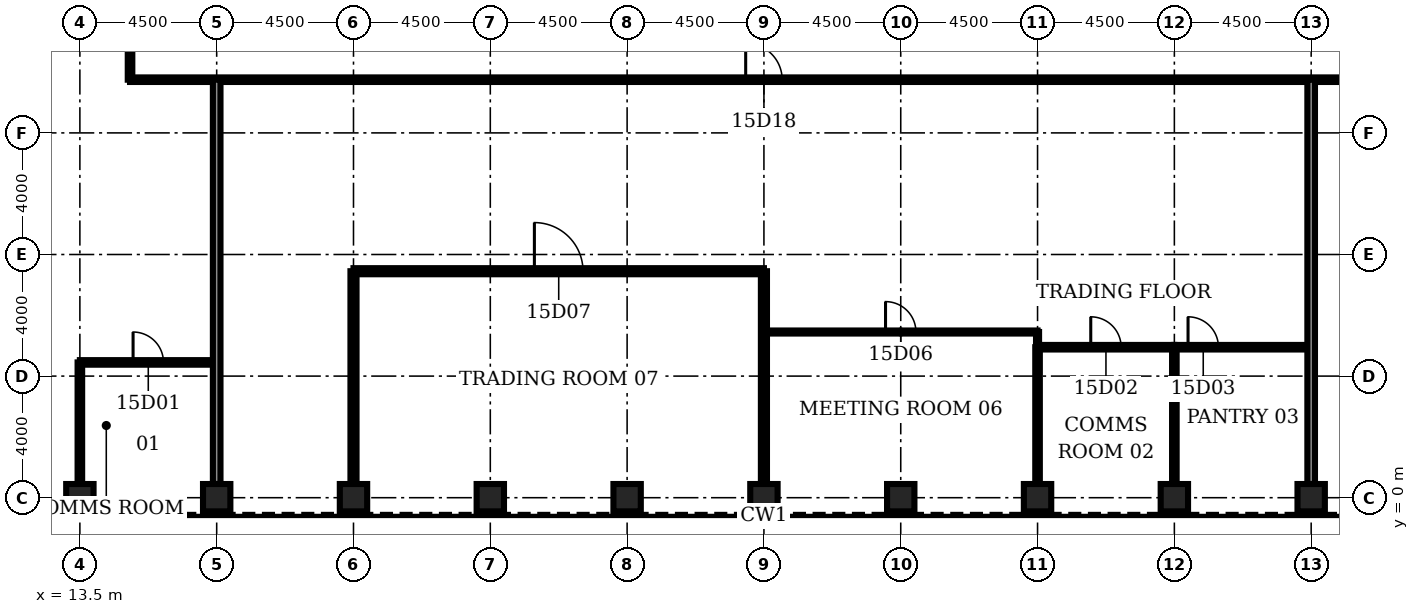
"""IFC4 building model, lengths in metres.
Left out: names, types, materials, properties, quantities, classifications, styles, units other than length and angle.
Written with IfcOpenShell. Run it as: python <this file> out.ifc"""

import sys

from ifc_helpers import new_model, si_unit, direction, frame, frame_2d, origin, origin_2d, place, context, subcontext, project, spatial, rectangle, hollow_rectangle, extrude, element, fill, save


model = new_model("IFC4")
c1 = context("Model", 3, precision=1e-05, world=origin(), true_north=direction((0.0, 1.0)))
c2 = subcontext(c1, "Body", "Model", "MODEL_VIEW")
j1 = project(units=[si_unit("LENGTHUNIT", "METRE"), si_unit("PLANEANGLEUNIT", "RADIAN")], contexts=[c1])
p1 = place(None, origin())
s1 = spatial("IfcSite", under=j1, at=p1, CompositionType="ELEMENT")
p2 = place(p1, origin())
s2 = spatial("IfcBuilding", under=s1, at=p2, CompositionType="ELEMENT")
p3 = place(p2, frame((0.0, 0.0, 72.5)))
s3 = spatial("IfcBuildingStorey", under=s2, at=p3, CompositionType="ELEMENT", Elevation=72.5)
for number, where, z_axis, x_axis in (
    (1, (13.5, 0.0, 0.0), (0.0, 0.0, 1.0), (0.0, 1.0, 0.0)),
    (2, (18.0, 0.0, 0.0), (0.0, 0.0, 1.0), (0.0, 1.0, 0.0)),
    (3, (22.5, 0.0, 0.0), (0.0, 0.0, 1.0), (0.0, 1.0, 0.0)),
    (4, (27.0, 0.0, 0.0), (0.0, 0.0, 1.0), (0.0, 1.0, 0.0)),
    (5, (31.5, 0.0, 0.0), (0.0, 0.0, 1.0), (0.0, 1.0, 0.0)),
    (6, (36.0, 0.0, 0.0), (0.0, 0.0, 1.0), (0.0, 1.0, 0.0)),
    (7, (40.5, 0.0, 0.0), (0.0, 0.0, 1.0), (0.0, 1.0, 0.0)),
    (8, (45.0, 0.0, 0.0), (0.0, 0.0, 1.0), (0.0, 1.0, 0.0)),
    (9, (49.5, 0.0, 0.0), (0.0, 0.0, 1.0), (0.0, 1.0, 0.0)),
    (10, (54.0, 0.0, 0.0), (0.0, 0.0, 1.0), (0.0, 1.0, 0.0)),
):
    element("IfcColumn", number, at=place(p3, frame(where, z_axis=z_axis, x_axis=x_axis)), inside=s3, PredefinedType="COLUMN", context=c2, shape_type="SweptSolid", body=[
        extrude(hollow_rectangle(XDim=0.9, YDim=0.9, WallThickness=0.12, at=origin_2d()), origin(), (0.0, 0.0, 1.0), 4.5),
    ])
p4 = place(p3, frame((13.5, 4.45, 0.0), z_axis=(0.0, 0.0, 1.0), x_axis=(1.0, 0.0, 0.0)))
e11 = element("IfcWall", 11, at=p4, inside=s3, PredefinedType="PARTITIONING", context=c2, shape_type="SweptSolid", body=[
    extrude(rectangle(XDim=4.5, YDim=0.15, at=frame_2d((2.25, 0.0))), origin(), (0.0, 0.0, 1.0), 3.0),
])
p5 = place(p4, frame((1.75, 0.0, 0.0)))
e12 = element("IfcOpeningElement", 12, at=p5, cuts=e11, PredefinedType="OPENING", context=c2, shape_type="SweptSolid", body=[
    extrude(rectangle(XDim=1.0, YDim=2.1, at=frame_2d((0.5, 1.05))), frame((0.0, 0.085, 0.0), z_axis=(0.0, -1.0, 0.0), x_axis=(1.0, 0.0, 0.0)), (0.0, 0.0, 1.0), 0.17),
])
p6 = place(p3, frame((45.0, 4.95, 0.0), z_axis=(0.0, 0.0, 1.0), x_axis=(1.0, 0.0, 0.0)))
e13 = element("IfcWall", 13, at=p6, inside=s3, PredefinedType="PARTITIONING", context=c2, shape_type="SweptSolid", body=[
    extrude(rectangle(XDim=4.5, YDim=0.15, at=frame_2d((2.25, 0.0))), origin(), (0.0, 0.0, 1.0), 3.0),
])
p7 = place(p6, frame((1.75, 0.0, 0.0)))
e14 = element("IfcOpeningElement", 14, at=p7, cuts=e13, PredefinedType="OPENING", context=c2, shape_type="SweptSolid", body=[
    extrude(rectangle(XDim=1.0, YDim=2.1, at=frame_2d((0.5, 1.05))), frame((0.0, 0.085, 0.0), z_axis=(0.0, -1.0, 0.0), x_axis=(1.0, 0.0, 0.0)), (0.0, 0.0, 1.0), 0.17),
])
p8 = place(p3, frame((49.5, 4.95, 0.0), z_axis=(0.0, 0.0, 1.0), x_axis=(1.0, 0.0, 0.0)))
e15 = element("IfcWall", 15, at=p8, inside=s3, PredefinedType="PARTITIONING", context=c2, shape_type="SweptSolid", body=[
    extrude(rectangle(XDim=4.5, YDim=0.15, at=frame_2d((2.25, 0.0))), origin(), (0.0, 0.0, 1.0), 3.0),
])
p9 = place(p8, frame((0.45, 0.0, 0.0)))
e16 = element("IfcOpeningElement", 16, at=p9, cuts=e15, PredefinedType="OPENING", context=c2, shape_type="SweptSolid", body=[
    extrude(rectangle(XDim=1.0, YDim=2.1, at=frame_2d((0.5, 1.05))), frame((0.0, 0.085, 0.0), z_axis=(0.0, -1.0, 0.0), x_axis=(1.0, 0.0, 0.0)), (0.0, 0.0, 1.0), 0.17),
])
p10 = place(p3, frame((36.0, 5.45, 0.0), z_axis=(0.0, 0.0, 1.0), x_axis=(1.0, 0.0, 0.0)))
e17 = element("IfcWall", 17, at=p10, inside=s3, PredefinedType="PARTITIONING", context=c2, shape_type="SweptSolid", body=[
    extrude(rectangle(XDim=9.0, YDim=0.1, at=frame_2d((4.5, 0.0))), origin(), (0.0, 0.0, 1.0), 3.0),
])
p11 = place(p10, frame((4.0, 0.0, 0.0)))
e18 = element("IfcOpeningElement", 18, at=p11, cuts=e17, PredefinedType="OPENING", context=c2, shape_type="SweptSolid", body=[
    extrude(rectangle(XDim=1.0, YDim=2.1, at=frame_2d((0.5, 1.05))), frame((0.0, 0.06, 0.0), z_axis=(0.0, -1.0, 0.0), x_axis=(1.0, 0.0, 0.0)), (0.0, 0.0, 1.0), 0.12),
])
p12 = place(p3, frame((22.5, 7.45, 0.0), z_axis=(0.0, 0.0, 1.0), x_axis=(1.0, 0.0, 0.0)))
e19 = element("IfcWall", 19, at=p12, inside=s3, PredefinedType="PARTITIONING", context=c2, shape_type="SweptSolid", body=[
    extrude(rectangle(XDim=13.5, YDim=0.2, at=frame_2d((6.75, 0.0))), origin(), (0.0, 0.0, 1.0), 3.0),
])
p13 = place(p12, frame((5.95, 0.0, 0.0)))
e20 = element("IfcOpeningElement", 20, at=p13, cuts=e19, PredefinedType="OPENING", context=c2, shape_type="SweptSolid", body=[
    extrude(rectangle(XDim=1.6, YDim=2.1, at=frame_2d((0.8, 1.05))), frame((0.0, 0.11, 0.0), z_axis=(0.0, -1.0, 0.0), x_axis=(1.0, 0.0, 0.0)), (0.0, 0.0, 1.0), 0.22),
])
p14 = place(p3, frame((15.15, 13.75, 0.0), z_axis=(0.0, 0.0, 1.0), x_axis=(1.0, 0.0, 0.0)))
e21 = element("IfcWall", 21, at=p14, inside=s3, PredefinedType="PARTITIONING", context=c2, shape_type="SweptSolid", body=[
    extrude(rectangle(XDim=41.7, YDim=0.15, at=frame_2d((20.85, 0.0))), origin(), (0.0, 0.0, 1.0), 3.0),
])
p15 = place(p14, frame((20.25, 0.0, 0.0)))
e22 = element("IfcOpeningElement", 22, at=p15, cuts=e21, PredefinedType="OPENING", context=c2, shape_type="SweptSolid", body=[
    extrude(rectangle(XDim=1.2, YDim=2.1, at=frame_2d((0.6, 1.05))), frame((0.0, 0.085, 0.0), z_axis=(0.0, -1.0, 0.0), x_axis=(1.0, 0.0, 0.0)), (0.0, 0.0, 1.0), 0.17),
])
p16 = place(p3, frame((13.5, 0.45, 0.0), z_axis=(0.0, 0.0, 1.0), x_axis=(0.0, 1.0, 0.0)))
e23 = element("IfcWall", 23, at=p16, inside=s3, PredefinedType="PARTITIONING", context=c2, shape_type="SweptSolid", body=[
    extrude(rectangle(XDim=4.0, YDim=0.15, at=frame_2d((2.0, 0.0))), origin(), (0.0, 0.0, 1.0), 3.0),
])
p17 = place(p3, frame((15.15, 13.75, 0.0), z_axis=(0.0, 0.0, 1.0), x_axis=(0.0, 1.0, 0.0)))
e24 = element("IfcWall", 24, at=p17, inside=s3, PredefinedType="PARTITIONING", context=c2, shape_type="SweptSolid", body=[
    extrude(rectangle(XDim=20.5, YDim=0.15, at=frame_2d((10.25, 0.0))), origin(), (0.0, 0.0, 1.0), 3.0),
])
p18 = place(p17, frame((9.65, 0.0, 0.0)))
e25 = element("IfcOpeningElement", 25, at=p18, cuts=e24, PredefinedType="OPENING", context=c2, shape_type="SweptSolid", body=[
    extrude(rectangle(XDim=1.2, YDim=2.1, at=frame_2d((0.6, 1.05))), frame((0.0, 0.085, 0.0), z_axis=(0.0, -1.0, 0.0), x_axis=(1.0, 0.0, 0.0)), (0.0, 0.0, 1.0), 0.17),
])
p19 = place(p3, frame((18.0, 0.45, 0.0), z_axis=(0.0, 0.0, 1.0), x_axis=(0.0, 1.0, 0.0)))
e26 = element("IfcWall", 26, at=p19, inside=s3, PredefinedType="PARTITIONING", context=c2, shape_type="SweptSolid", body=[
    extrude(rectangle(XDim=13.3, YDim=0.25, at=frame_2d((6.65, 0.0))), origin(), (0.0, 0.0, 1.0), 3.0),
])
for number, where, z_axis, x_axis in (
    (27, (22.5, 0.45, 0.0), (0.0, 0.0, 1.0), (0.0, 1.0, 0.0)),
    (28, (36.0, 0.45, 0.0), (0.0, 0.0, 1.0), (0.0, 1.0, 0.0)),
):
    element("IfcWall", number, at=place(p3, frame(where, z_axis=z_axis, x_axis=x_axis)), inside=s3, PredefinedType="PARTITIONING", context=c2, shape_type="SweptSolid", body=[
        extrude(rectangle(XDim=7.0, YDim=0.2, at=frame_2d((3.5, 0.0))), origin(), (0.0, 0.0, 1.0), 3.0),
    ])
p20 = place(p3, frame((45.0, 0.45, 0.0), z_axis=(0.0, 0.0, 1.0), x_axis=(0.0, 1.0, 0.0)))
e29 = element("IfcWall", 29, at=p20, inside=s3, PredefinedType="PARTITIONING", context=c2, shape_type="SweptSolid", body=[
    extrude(rectangle(XDim=4.5, YDim=0.15, at=frame_2d((2.25, 0.0))), origin(), (0.0, 0.0, 1.0), 3.0),
])
p21 = place(p3, frame((45.0, 4.95, 0.0), z_axis=(0.0, 0.0, 1.0), x_axis=(0.0, 1.0, 0.0)))
e30 = element("IfcWall", 30, at=p21, inside=s3, PredefinedType="PARTITIONING", context=c2, shape_type="SweptSolid", body=[
    extrude(rectangle(XDim=0.5, YDim=0.1, at=frame_2d((0.25, 0.0))), origin(), (0.0, 0.0, 1.0), 3.0),
])
p22 = place(p3, frame((49.5, 0.45, 0.0), z_axis=(0.0, 0.0, 1.0), x_axis=(0.0, 1.0, 0.0)))
e31 = element("IfcWall", 31, at=p22, inside=s3, PredefinedType="PARTITIONING", context=c2, shape_type="SweptSolid", body=[
    extrude(rectangle(XDim=4.5, YDim=0.15, at=frame_2d((2.25, 0.0))), origin(), (0.0, 0.0, 1.0), 3.0),
])
p23 = place(p3, frame((54.0, 0.45, 0.0), z_axis=(0.0, 0.0, 1.0), x_axis=(0.0, 1.0, 0.0)))
e32 = element("IfcWall", 32, at=p23, inside=s3, PredefinedType="PARTITIONING", context=c2, shape_type="SweptSolid", body=[
    extrude(rectangle(XDim=13.3, YDim=0.25, at=frame_2d((6.65, 0.0))), origin(), (0.0, 0.0, 1.0), 3.0),
])
p24 = place(p5, origin())
e33 = element("IfcDoor", 33, at=p24, inside=s3, OperationType="SINGLE_SWING_LEFT", PredefinedType="DOOR", context=c2, shape_type="SweptSolid", body=[
    extrude(rectangle(XDim=1.0, YDim=2.1, at=frame_2d((0.5, 1.05))), frame((0.0, 0.025, 0.0), z_axis=(0.0, -1.0, 0.0), x_axis=(1.0, 0.0, 0.0)), (0.0, 0.0, 1.0), 0.05),
])
fill(e12, e33)
p25 = place(p7, origin())
e34 = element("IfcDoor", 34, at=p25, inside=s3, OperationType="SINGLE_SWING_LEFT", PredefinedType="DOOR", context=c2, shape_type="SweptSolid", body=[
    extrude(rectangle(XDim=1.0, YDim=2.1, at=frame_2d((0.5, 1.05))), frame((0.0, 0.025, 0.0), z_axis=(0.0, -1.0, 0.0), x_axis=(1.0, 0.0, 0.0)), (0.0, 0.0, 1.0), 0.05),
])
fill(e14, e34)
p26 = place(p9, origin())
e35 = element("IfcDoor", 35, at=p26, inside=s3, OperationType="SINGLE_SWING_LEFT", PredefinedType="DOOR", context=c2, shape_type="SweptSolid", body=[
    extrude(rectangle(XDim=1.0, YDim=2.1, at=frame_2d((0.5, 1.05))), frame((0.0, 0.025, 0.0), z_axis=(0.0, -1.0, 0.0), x_axis=(1.0, 0.0, 0.0)), (0.0, 0.0, 1.0), 0.05),
])
fill(e16, e35)
p27 = place(p11, origin())
e36 = element("IfcDoor", 36, at=p27, inside=s3, OperationType="SINGLE_SWING_LEFT", PredefinedType="DOOR", context=c2, shape_type="SweptSolid", body=[
    extrude(rectangle(XDim=1.0, YDim=2.1, at=frame_2d((0.5, 1.05))), frame((0.0, 0.025, 0.0), z_axis=(0.0, -1.0, 0.0), x_axis=(1.0, 0.0, 0.0)), (0.0, 0.0, 1.0), 0.05),
])
fill(e18, e36)
p28 = place(p13, origin())
e37 = element("IfcDoor", 37, at=p28, inside=s3, OperationType="SINGLE_SWING_LEFT", PredefinedType="DOOR", context=c2, shape_type="SweptSolid", body=[
    extrude(rectangle(XDim=1.6, YDim=2.1, at=frame_2d((0.8, 1.05))), frame((0.0, 0.025, 0.0), z_axis=(0.0, -1.0, 0.0), x_axis=(1.0, 0.0, 0.0)), (0.0, 0.0, 1.0), 0.05),
])
fill(e20, e37)
p29 = place(p15, origin())
e38 = element("IfcDoor", 38, at=p29, inside=s3, OperationType="SINGLE_SWING_LEFT", PredefinedType="DOOR", context=c2, shape_type="SweptSolid", body=[
    extrude(rectangle(XDim=1.2, YDim=2.1, at=frame_2d((0.6, 1.05))), frame((0.0, 0.025, 0.0), z_axis=(0.0, -1.0, 0.0), x_axis=(1.0, 0.0, 0.0)), (0.0, 0.0, 1.0), 0.05),
])
fill(e22, e38)
save(model, sys.argv[1])
